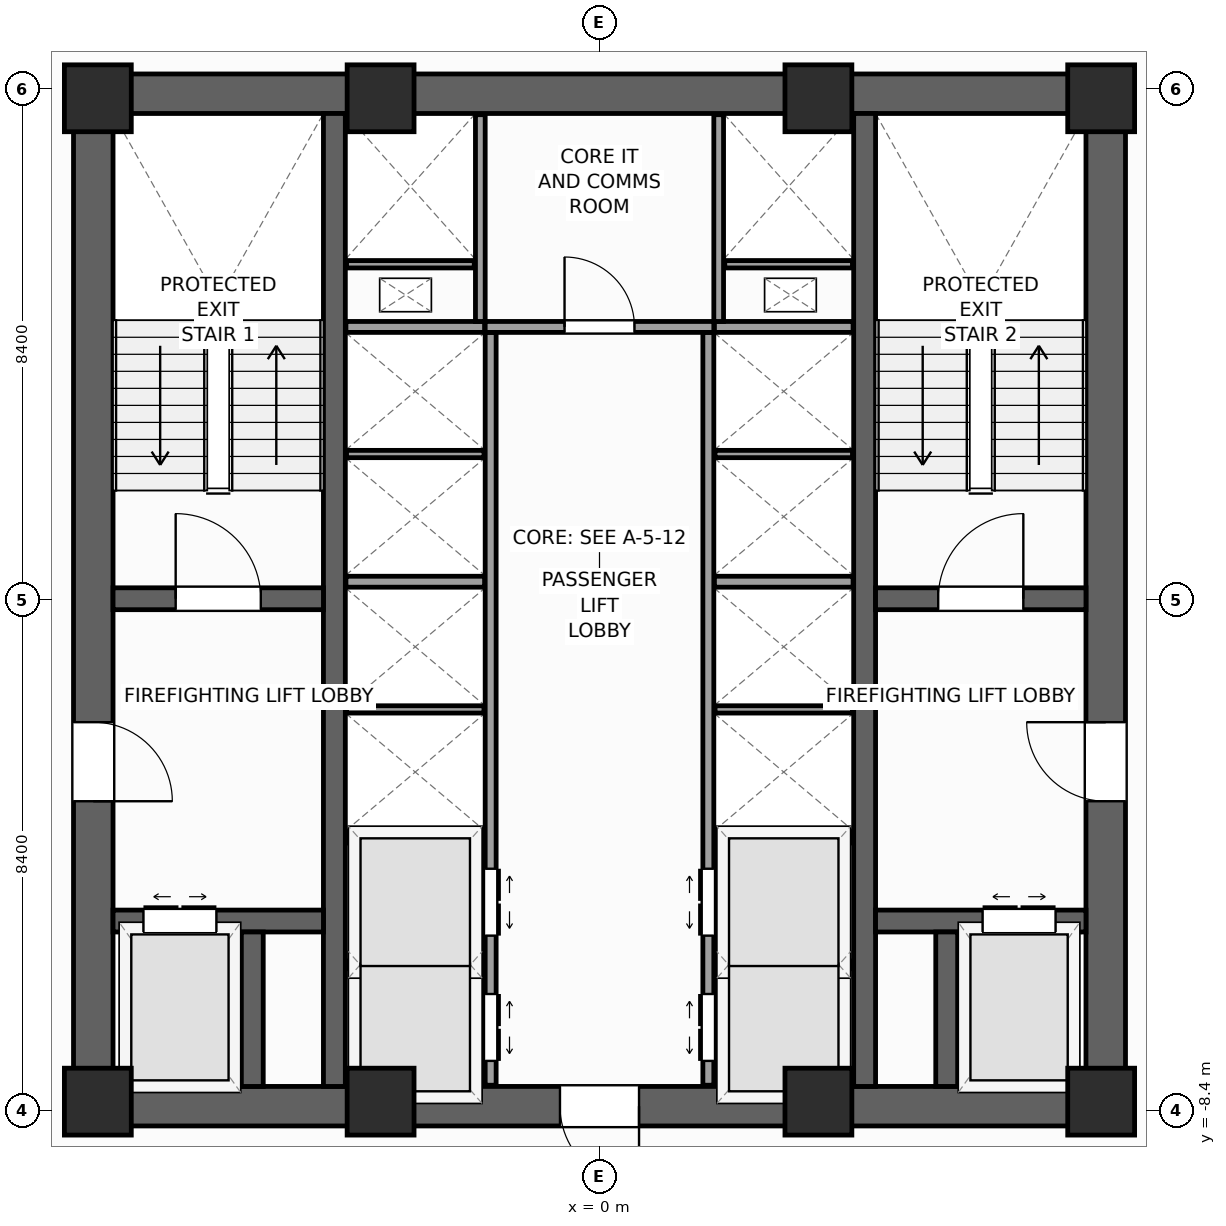
"""IFC4 building model, lengths in metres.
Left out: names, types, materials, properties, quantities, classifications, styles, units other than length and angle.
Written with IfcOpenShell. Run it as: python <this file> out.ifc"""

import sys

from ifc_helpers import new_model, si_unit, direction, frame, frame_2d, origin, origin_2d, place, context, subcontext, project, spatial, rectangle, extrude, source, transform, mapped, element, fill, save


model = new_model("IFC4")
c1 = context("Model", 3, precision=1e-05, world=origin(), true_north=direction((0.0, 1.0)))
c2 = subcontext(c1, "Body", "Model", "MODEL_VIEW")
j1 = project(units=[si_unit("LENGTHUNIT", "METRE"), si_unit("PLANEANGLEUNIT", "RADIAN")], contexts=[c1])
p1 = place(None, origin())
s1 = spatial("IfcSite", under=j1, at=p1, CompositionType="ELEMENT")
p2 = place(p1, origin())
s2 = spatial("IfcBuilding", under=s1, at=p2, CompositionType="ELEMENT")
p3 = place(p2, frame((0.0, 0.0, 111.2)))
s3 = spatial("IfcBuildingStorey", under=s2, at=p3, CompositionType="ELEMENT", Elevation=111.2)
p4 = place(p3, frame((-8.65, -8.325, 0.0), z_axis=(0.0, 0.0, 1.0), x_axis=(1.0, 0.0, 0.0)))
e1 = element("IfcWall", 1, at=p4, inside=s3, PredefinedType="SHEAR", context=c2, shape_type="SweptSolid", body=[
    extrude(rectangle(XDim=17.3, YDim=0.65, at=frame_2d((8.65, 0.0))), origin(), (0.0, 0.0, 1.0), 4.0),
])
p5 = place(p4, frame((8.0, 0.0, 0.0)))
e2 = element("IfcOpeningElement", 2, at=p5, cuts=e1, PredefinedType="OPENING", context=c2, shape_type="SweptSolid", body=[
    extrude(rectangle(XDim=1.3, YDim=2.2, at=frame_2d((0.65, 1.1))), frame((0.0, 0.335, 0.0), z_axis=(0.0, -1.0, 0.0), x_axis=(1.0, 0.0, 0.0)), (0.0, 0.0, 1.0), 0.67),
])
p6 = place(p3, frame((-8.65, 8.325, 0.0), z_axis=(0.0, 0.0, 1.0), x_axis=(1.0, 0.0, 0.0)))
e3 = element("IfcWall", 3, at=p6, inside=s3, PredefinedType="SHEAR", context=c2, shape_type="SweptSolid", body=[
    extrude(rectangle(XDim=17.3, YDim=0.65, at=frame_2d((8.65, 0.0))), origin(), (0.0, 0.0, 1.0), 4.0),
])
p7 = place(p3, frame((-8.325, -8.0, 0.0), z_axis=(0.0, 0.0, 1.0), x_axis=(0.0, 1.0, 0.0)))
e4 = element("IfcWall", 4, at=p7, inside=s3, PredefinedType="SHEAR", context=c2, shape_type="SweptSolid", body=[
    extrude(rectangle(XDim=16.0, YDim=0.65, at=frame_2d((8.0, 0.0))), origin(), (0.0, 0.0, 1.0), 4.0),
])
p8 = place(p7, frame((4.69, 0.0, 0.0)))
e5 = element("IfcOpeningElement", 5, at=p8, cuts=e4, PredefinedType="OPENING", context=c2, shape_type="SweptSolid", body=[
    extrude(rectangle(XDim=1.3, YDim=2.2, at=frame_2d((0.65, 1.1))), frame((0.0, 0.335, 0.0), z_axis=(0.0, -1.0, 0.0), x_axis=(1.0, 0.0, 0.0)), (0.0, 0.0, 1.0), 0.67),
])
p9 = place(p3, frame((8.325, -8.0, 0.0), z_axis=(0.0, 0.0, 1.0), x_axis=(0.0, 1.0, 0.0)))
e6 = element("IfcWall", 6, at=p9, inside=s3, PredefinedType="SHEAR", context=c2, shape_type="SweptSolid", body=[
    extrude(rectangle(XDim=16.0, YDim=0.65, at=frame_2d((8.0, 0.0))), origin(), (0.0, 0.0, 1.0), 4.0),
])
p10 = place(p9, frame((4.69, 0.0, 0.0)))
e7 = element("IfcOpeningElement", 7, at=p10, cuts=e6, PredefinedType="OPENING", context=c2, shape_type="SweptSolid", body=[
    extrude(rectangle(XDim=1.3, YDim=2.2, at=frame_2d((0.65, 1.1))), frame((0.0, 0.335, 0.0), z_axis=(0.0, -1.0, 0.0), x_axis=(1.0, 0.0, 0.0)), (0.0, 0.0, 1.0), 0.67),
])
for number, where, z_axis, x_axis in (
    (8, (-4.36, -8.0, 0.0), (0.0, 0.0, 1.0), (0.0, 1.0, 0.0)),
    (9, (4.36, -8.0, 0.0), (0.0, 0.0, 1.0), (0.0, 1.0, 0.0)),
):
    element("IfcWall", number, at=place(p3, frame(where, z_axis=z_axis, x_axis=x_axis)), inside=s3, PredefinedType="SHEAR", context=c2, shape_type="SweptSolid", body=[
        extrude(rectangle(XDim=16.0, YDim=0.36, at=frame_2d((8.0, 0.0))), origin(), (0.0, 0.0, 1.0), 4.0),
    ])
p11 = place(p3, frame((-8.0, 0.02, 0.0), z_axis=(0.0, 0.0, 1.0), x_axis=(1.0, 0.0, 0.0)))
e10 = element("IfcWall", 10, at=p11, inside=s3, PredefinedType="SHEAR", context=c2, shape_type="SweptSolid", body=[
    extrude(rectangle(XDim=3.46, YDim=0.36, at=frame_2d((1.73, 0.0))), origin(), (0.0, 0.0, 1.0), 4.0),
])
p12 = place(p11, frame((1.03, 0.0, 0.0)))
e11 = element("IfcOpeningElement", 11, at=p12, cuts=e10, PredefinedType="OPENING", context=c2, shape_type="SweptSolid", body=[
    extrude(rectangle(XDim=1.4, YDim=2.2, at=frame_2d((0.7, 1.1))), frame((0.0, 0.19, 0.0), z_axis=(0.0, -1.0, 0.0), x_axis=(1.0, 0.0, 0.0)), (0.0, 0.0, 1.0), 0.38),
])
p13 = place(p3, frame((4.54, 0.02, 0.0), z_axis=(0.0, 0.0, 1.0), x_axis=(1.0, 0.0, 0.0)))
e12 = element("IfcWall", 12, at=p13, inside=s3, PredefinedType="SHEAR", context=c2, shape_type="SweptSolid", body=[
    extrude(rectangle(XDim=3.46, YDim=0.36, at=frame_2d((1.73, 0.0))), origin(), (0.0, 0.0, 1.0), 4.0),
])
p14 = place(p13, frame((1.03, 0.0, 0.0)))
e13 = element("IfcOpeningElement", 13, at=p14, cuts=e12, PredefinedType="OPENING", context=c2, shape_type="SweptSolid", body=[
    extrude(rectangle(XDim=1.4, YDim=2.2, at=frame_2d((0.7, 1.1))), frame((0.0, 0.19, 0.0), z_axis=(0.0, -1.0, 0.0), x_axis=(1.0, 0.0, 0.0)), (0.0, 0.0, 1.0), 0.38),
])
p15 = place(p3, frame((-8.0, -5.28, 0.0), z_axis=(0.0, 0.0, 1.0), x_axis=(1.0, 0.0, 0.0)))
e14 = element("IfcWall", 14, at=p15, inside=s3, PredefinedType="SHEAR", context=c2, shape_type="SweptSolid", body=[
    extrude(rectangle(XDim=3.46, YDim=0.36, at=frame_2d((1.73, 0.0))), origin(), (0.0, 0.0, 1.0), 4.0),
])
p16 = place(p15, frame((0.5, 0.0, 0.0)))
e15 = element("IfcOpeningElement", 15, at=p16, cuts=e14, PredefinedType="OPENING", context=c2, shape_type="SweptSolid", body=[
    extrude(rectangle(XDim=1.2, YDim=2.25, at=frame_2d((0.6, 1.125))), frame((0.0, 0.19, 0.0), z_axis=(0.0, -1.0, 0.0), x_axis=(1.0, 0.0, 0.0)), (0.0, 0.0, 1.0), 0.38),
])
p17 = place(p3, frame((4.54, -5.28, 0.0), z_axis=(0.0, 0.0, 1.0), x_axis=(1.0, 0.0, 0.0)))
e16 = element("IfcWall", 16, at=p17, inside=s3, PredefinedType="SHEAR", context=c2, shape_type="SweptSolid", body=[
    extrude(rectangle(XDim=3.46, YDim=0.36, at=frame_2d((1.73, 0.0))), origin(), (0.0, 0.0, 1.0), 4.0),
])
p18 = place(p17, frame((1.76, 0.0, 0.0)))
e17 = element("IfcOpeningElement", 17, at=p18, cuts=e16, PredefinedType="OPENING", context=c2, shape_type="SweptSolid", body=[
    extrude(rectangle(XDim=1.2, YDim=2.25, at=frame_2d((0.6, 1.125))), frame((0.0, 0.19, 0.0), z_axis=(0.0, -1.0, 0.0), x_axis=(1.0, 0.0, 0.0)), (0.0, 0.0, 1.0), 0.38),
])
for number, where, z_axis, x_axis in (
    (18, (-5.71, -8.0, 0.0), (0.0, 0.0, 1.0), (0.0, 1.0, 0.0)),
    (19, (5.71, -8.0, 0.0), (0.0, 0.0, 1.0), (0.0, 1.0, 0.0)),
):
    element("IfcWall", number, at=place(p3, frame(where, z_axis=z_axis, x_axis=x_axis)), inside=s3, PredefinedType="SHEAR", context=c2, shape_type="SweptSolid", body=[
        extrude(rectangle(XDim=2.54, YDim=0.36, at=frame_2d((1.27, 0.0))), origin(), (0.0, 0.0, 1.0), 4.0),
    ])
m1 = source(origin(), c2, "Body", "SweptSolid", [
    extrude(rectangle(XDim=1.1, YDim=1.1, at=origin_2d()), origin(), (0.0, 0.0, 1.0), 4.0),
])
for number, where, z_axis, x_axis in (
    (20, (-8.25, -8.25, 0.0), (0.0, 0.0, 1.0), (1.0, 0.0, 0.0)),
    (21, (8.25, -8.25, 0.0), (0.0, 0.0, 1.0), (1.0, 0.0, 0.0)),
    (22, (8.25, 8.25, 0.0), (0.0, 0.0, 1.0), (1.0, 0.0, 0.0)),
    (23, (-8.25, 8.25, 0.0), (0.0, 0.0, 1.0), (1.0, 0.0, 0.0)),
    (24, (-3.6, -8.25, 0.0), (0.0, 0.0, 1.0), (1.0, 0.0, 0.0)),
    (25, (3.6, -8.25, 0.0), (0.0, 0.0, 1.0), (1.0, 0.0, 0.0)),
    (26, (-3.6, 8.25, 0.0), (0.0, 0.0, 1.0), (1.0, 0.0, 0.0)),
    (27, (3.6, 8.25, 0.0), (0.0, 0.0, 1.0), (1.0, 0.0, 0.0)),
):
    element("IfcColumn", number, at=place(p3, frame(where, z_axis=z_axis, x_axis=x_axis)), inside=s3, PredefinedType="PILASTER", context=c2, shape_type="MappedRepresentation", body=[
        mapped(m1, transform((0.0, 0.0, 0.0), scale=1.0)),
    ])
p19 = place(p3, frame((-1.79, -7.98, 0.0), z_axis=(0.0, 0.0, 1.0), x_axis=(0.0, 1.0, 0.0)))
e28 = element("IfcWall", 28, at=p19, inside=s3, PredefinedType="PARTITIONING", context=c2, shape_type="SweptSolid", body=[
    extrude(rectangle(XDim=12.38, YDim=0.18, at=frame_2d((6.19, 0.0))), origin(), (0.0, 0.0, 1.0), 3.74),
])
p20 = place(p19, frame((0.4, 0.0, 0.0)))
e29 = element("IfcOpeningElement", 29, at=p20, cuts=e28, PredefinedType="OPENING", context=c2, shape_type="SweptSolid", body=[
    extrude(rectangle(XDim=1.1, YDim=2.2, at=frame_2d((0.55, 1.1))), frame((0.0, 0.1, 0.0), z_axis=(0.0, -1.0, 0.0), x_axis=(1.0, 0.0, 0.0)), (0.0, 0.0, 1.0), 0.2),
])
p21 = place(p19, frame((2.46, 0.0, 0.0)))
e30 = element("IfcOpeningElement", 30, at=p21, cuts=e28, PredefinedType="OPENING", context=c2, shape_type="SweptSolid", body=[
    extrude(rectangle(XDim=1.1, YDim=2.2, at=frame_2d((0.55, 1.1))), frame((0.0, 0.1, 0.0), z_axis=(0.0, -1.0, 0.0), x_axis=(1.0, 0.0, 0.0)), (0.0, 0.0, 1.0), 0.2),
])
p22 = place(p3, frame((1.79, -7.98, 0.0), z_axis=(0.0, 0.0, 1.0), x_axis=(0.0, 1.0, 0.0)))
e31 = element("IfcWall", 31, at=p22, inside=s3, PredefinedType="PARTITIONING", context=c2, shape_type="SweptSolid", body=[
    extrude(rectangle(XDim=12.38, YDim=0.18, at=frame_2d((6.19, 0.0))), origin(), (0.0, 0.0, 1.0), 3.74),
])
p23 = place(p22, frame((0.4, 0.0, 0.0)))
e32 = element("IfcOpeningElement", 32, at=p23, cuts=e31, PredefinedType="OPENING", context=c2, shape_type="SweptSolid", body=[
    extrude(rectangle(XDim=1.1, YDim=2.2, at=frame_2d((0.55, 1.1))), frame((0.0, 0.1, 0.0), z_axis=(0.0, -1.0, 0.0), x_axis=(1.0, 0.0, 0.0)), (0.0, 0.0, 1.0), 0.2),
])
p24 = place(p22, frame((2.46, 0.0, 0.0)))
e33 = element("IfcOpeningElement", 33, at=p24, cuts=e31, PredefinedType="OPENING", context=c2, shape_type="SweptSolid", body=[
    extrude(rectangle(XDim=1.1, YDim=2.2, at=frame_2d((0.55, 1.1))), frame((0.0, 0.1, 0.0), z_axis=(0.0, -1.0, 0.0), x_axis=(1.0, 0.0, 0.0)), (0.0, 0.0, 1.0), 0.2),
])
p25 = place(p3, frame((-1.88, 4.49, 0.0), z_axis=(0.0, 0.0, 1.0), x_axis=(1.0, 0.0, 0.0)))
e34 = element("IfcWall", 34, at=p25, inside=s3, PredefinedType="PARTITIONING", context=c2, shape_type="SweptSolid", body=[
    extrude(rectangle(XDim=3.76, YDim=0.18, at=frame_2d((1.88, 0.0))), origin(), (0.0, 0.0, 1.0), 3.74),
])
p26 = place(p25, frame((1.305, 0.0, 0.0)))
e35 = element("IfcOpeningElement", 35, at=p26, cuts=e34, PredefinedType="OPENING", context=c2, shape_type="SweptSolid", body=[
    extrude(rectangle(XDim=1.15, YDim=2.25, at=frame_2d((0.575, 1.125))), frame((0.0, 0.1, 0.0), z_axis=(0.0, -1.0, 0.0), x_axis=(1.0, 0.0, 0.0)), (0.0, 0.0, 1.0), 0.2),
])
for number, where, z_axis, x_axis in (
    (36, (-4.17, -3.9, 0.0), (0.0, 0.0, 1.0), (1.0, 0.0, 0.0)),
    (37, (1.89, -3.9, 0.0), (0.0, 0.0, 1.0), (1.0, 0.0, 0.0)),
    (38, (-4.17, 0.3, 0.0), (0.0, 0.0, 1.0), (1.0, 0.0, 0.0)),
    (39, (1.89, 0.3, 0.0), (0.0, 0.0, 1.0), (1.0, 0.0, 0.0)),
    (40, (-4.17, 4.49, 0.0), (0.0, 0.0, 1.0), (1.0, 0.0, 0.0)),
    (41, (1.89, 4.49, 0.0), (0.0, 0.0, 1.0), (1.0, 0.0, 0.0)),
):
    element("IfcWall", number, at=place(p3, frame(where, z_axis=z_axis, x_axis=x_axis)), inside=s3, PredefinedType="PARTITIONING", context=c2, shape_type="SweptSolid", body=[
        extrude(rectangle(XDim=2.28, YDim=0.18, at=frame_2d((1.14, 0.0))), origin(), (0.0, 0.0, 1.0), 3.74),
    ])
for number, where, z_axis, x_axis in (
    (42, (-4.16, -6.0, 0.0), (0.0, 0.0, 1.0), (1.0, 0.0, 0.0)),
    (43, (1.9, -6.0, 0.0), (0.0, 0.0, 1.0), (1.0, 0.0, 0.0)),
    (44, (-4.16, -1.8, 0.0), (0.0, 0.0, 1.0), (1.0, 0.0, 0.0)),
    (45, (1.9, -1.8, 0.0), (0.0, 0.0, 1.0), (1.0, 0.0, 0.0)),
    (46, (-4.16, 2.4, 0.0), (0.0, 0.0, 1.0), (1.0, 0.0, 0.0)),
    (47, (1.9, 2.4, 0.0), (0.0, 0.0, 1.0), (1.0, 0.0, 0.0)),
):
    element("IfcWall", number, at=place(p3, frame(where, z_axis=z_axis, x_axis=x_axis)), inside=s3, PredefinedType="PARTITIONING", context=c2, shape_type="SweptSolid", body=[
        extrude(rectangle(XDim=2.26, YDim=0.12, at=frame_2d((1.13, 0.0))), origin(), (0.0, 0.0, 1.0), 3.74),
    ])
for number, where, z_axis, x_axis in (
    (48, (-1.96, 4.58, 0.0), (0.0, 0.0, 1.0), (0.0, 1.0, 0.0)),
    (49, (1.96, 4.58, 0.0), (0.0, 0.0, 1.0), (0.0, 1.0, 0.0)),
):
    element("IfcWall", number, at=place(p3, frame(where, z_axis=z_axis, x_axis=x_axis)), inside=s3, PredefinedType="PARTITIONING", context=c2, shape_type="SweptSolid", body=[
        extrude(rectangle(XDim=3.4, YDim=0.16, at=frame_2d((1.7, 0.0))), origin(), (0.0, 0.0, 1.0), 3.74),
    ])
for number, where, z_axis, x_axis in (
    (50, (-4.16, 5.52, 0.0), (0.0, 0.0, 1.0), (1.0, 0.0, 0.0)),
    (51, (2.06, 5.52, 0.0), (0.0, 0.0, 1.0), (1.0, 0.0, 0.0)),
):
    element("IfcWall", number, at=place(p3, frame(where, z_axis=z_axis, x_axis=x_axis)), inside=s3, PredefinedType="PARTITIONING", context=c2, shape_type="SweptSolid", body=[
        extrude(rectangle(XDim=2.1, YDim=0.12, at=frame_2d((1.05, 0.0))), origin(), (0.0, 0.0, 1.0), 3.74),
    ])
m2 = source(origin(), c2, "Body", "SweptSolid", [
    extrude(rectangle(XDim=1.4, YDim=2.2, at=frame_2d((0.7, 1.1))), frame((0.0, 0.025, 0.0), z_axis=(0.0, -1.0, 0.0), x_axis=(1.0, 0.0, 0.0)), (0.0, 0.0, 1.0), 0.05),
])
p27 = place(p12, origin())
e52 = element("IfcDoor", 52, at=p27, inside=s3, OperationType="SINGLE_SWING_LEFT", PredefinedType="DOOR", context=c2, shape_type="MappedRepresentation", body=[
    mapped(m2, transform((0.0, 0.0, 0.0), scale=1.0)),
])
fill(e11, e52)
p28 = place(p14, origin())
e53 = element("IfcDoor", 53, at=p28, inside=s3, OperationType="SINGLE_SWING_RIGHT", PredefinedType="DOOR", context=c2, shape_type="MappedRepresentation", body=[
    mapped(m2, transform((0.0, 0.0, 0.0), scale=1.0)),
])
fill(e13, e53)
m3 = source(origin(), c2, "Body", "SweptSolid", [
    extrude(rectangle(XDim=1.3, YDim=2.2, at=frame_2d((0.65, 1.1))), frame((0.0, 0.025, 0.0), z_axis=(0.0, -1.0, 0.0), x_axis=(1.0, 0.0, 0.0)), (0.0, 0.0, 1.0), 0.05),
])
p29 = place(p8, frame((1.3, 0.0, 0.0), z_axis=(0.0, 0.0, 1.0), x_axis=(-1.0, 0.0, 0.0)))
e54 = element("IfcDoor", 54, at=p29, inside=s3, OperationType="SINGLE_SWING_LEFT", PredefinedType="DOOR", context=c2, shape_type="MappedRepresentation", body=[
    mapped(m3, transform((0.0, 0.0, 0.0), scale=1.0)),
])
fill(e5, e54)
p30 = place(p10, origin())
e55 = element("IfcDoor", 55, at=p30, inside=s3, OperationType="SINGLE_SWING_RIGHT", PredefinedType="DOOR", context=c2, shape_type="MappedRepresentation", body=[
    mapped(m3, transform((0.0, 0.0, 0.0), scale=1.0)),
])
fill(e7, e55)
p31 = place(p5, frame((1.3, 0.0, 0.0), z_axis=(0.0, 0.0, 1.0), x_axis=(-1.0, 0.0, 0.0)))
e56 = element("IfcDoor", 56, at=p31, inside=s3, OperationType="SINGLE_SWING_RIGHT", PredefinedType="DOOR", context=c2, shape_type="MappedRepresentation", body=[
    mapped(m3, transform((0.0, 0.0, 0.0), scale=1.0)),
])
fill(e2, e56)
m4 = source(origin(), c2, "Body", "SweptSolid", [
    extrude(rectangle(XDim=1.2, YDim=2.25, at=frame_2d((0.6, 1.125))), frame((0.0, 0.025, 0.0), z_axis=(0.0, -1.0, 0.0), x_axis=(1.0, 0.0, 0.0)), (0.0, 0.0, 1.0), 0.05),
])
p32 = place(p16, origin())
e57 = element("IfcDoor", 57, at=p32, inside=s3, OperationType="DOUBLE_DOOR_SLIDING", PredefinedType="DOOR", context=c2, shape_type="MappedRepresentation", body=[
    mapped(m4, transform((0.0, 0.0, 0.0), scale=1.0)),
])
fill(e15, e57)
p33 = place(p18, origin())
e58 = element("IfcDoor", 58, at=p33, inside=s3, OperationType="DOUBLE_DOOR_SLIDING", PredefinedType="DOOR", context=c2, shape_type="MappedRepresentation", body=[
    mapped(m4, transform((0.0, 0.0, 0.0), scale=1.0)),
])
fill(e17, e58)
m5 = source(origin(), c2, "Body", "SweptSolid", [
    extrude(rectangle(XDim=1.1, YDim=2.2, at=frame_2d((0.55, 1.1))), frame((0.0, 0.025, 0.0), z_axis=(0.0, -1.0, 0.0), x_axis=(1.0, 0.0, 0.0)), (0.0, 0.0, 1.0), 0.05),
])
p34 = place(p20, frame((1.1, 0.0, 0.0), z_axis=(0.0, 0.0, 1.0), x_axis=(-1.0, 0.0, 0.0)))
e59 = element("IfcDoor", 59, at=p34, inside=s3, OperationType="DOUBLE_DOOR_SLIDING", PredefinedType="DOOR", context=c2, shape_type="MappedRepresentation", body=[
    mapped(m5, transform((0.0, 0.0, 0.0), scale=1.0)),
])
fill(e29, e59)
p35 = place(p21, frame((1.1, 0.0, 0.0), z_axis=(0.0, 0.0, 1.0), x_axis=(-1.0, 0.0, 0.0)))
e60 = element("IfcDoor", 60, at=p35, inside=s3, OperationType="DOUBLE_DOOR_SLIDING", PredefinedType="DOOR", context=c2, shape_type="MappedRepresentation", body=[
    mapped(m5, transform((0.0, 0.0, 0.0), scale=1.0)),
])
fill(e30, e60)
p36 = place(p23, origin())
e61 = element("IfcDoor", 61, at=p36, inside=s3, OperationType="DOUBLE_DOOR_SLIDING", PredefinedType="DOOR", context=c2, shape_type="MappedRepresentation", body=[
    mapped(m5, transform((0.0, 0.0, 0.0), scale=1.0)),
])
fill(e32, e61)
p37 = place(p24, origin())
e62 = element("IfcDoor", 62, at=p37, inside=s3, OperationType="DOUBLE_DOOR_SLIDING", PredefinedType="DOOR", context=c2, shape_type="MappedRepresentation", body=[
    mapped(m5, transform((0.0, 0.0, 0.0), scale=1.0)),
])
fill(e33, e62)
m6 = source(origin(), c2, "Body", "SweptSolid", [
    extrude(rectangle(XDim=1.15, YDim=2.25, at=frame_2d((0.575, 1.125))), frame((0.0, 0.025, 0.0), z_axis=(0.0, -1.0, 0.0), x_axis=(1.0, 0.0, 0.0)), (0.0, 0.0, 1.0), 0.05),
])
p38 = place(p26, origin())
e63 = element("IfcDoor", 63, at=p38, inside=s3, OperationType="SINGLE_SWING_LEFT", PredefinedType="DOOR", context=c2, shape_type="MappedRepresentation", body=[
    mapped(m6, transform((0.0, 0.0, 0.0), scale=1.0)),
])
fill(e35, e63)
save(model, sys.argv[1])
